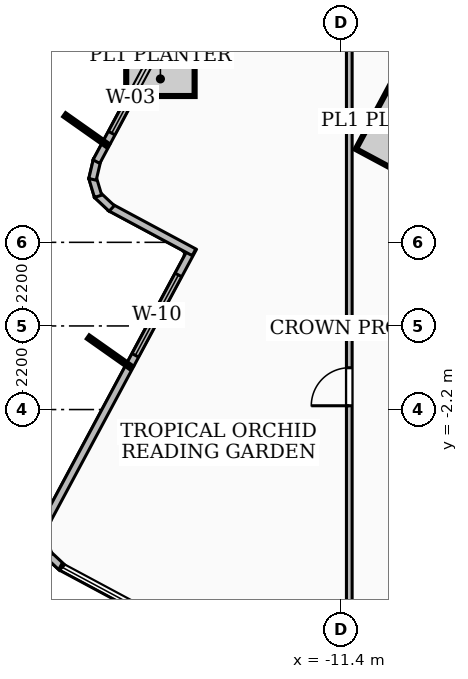
"""IFC4 building model, lengths in metres.
Left out: names, types, materials, properties, quantities, classifications, styles, units other than length and angle.
Written with IfcOpenShell. Run it as: python <this file> out.ifc"""

import sys

from ifc_helpers import new_model, si_unit, direction, frame, frame_2d, origin, place, context, subcontext, project, spatial, rectangle, extrude, element, fill, save


model = new_model("IFC4")
c1 = context("Model", 3, precision=1e-05, world=origin(), true_north=direction((0.0, 1.0)))
c2 = subcontext(c1, "Body", "Model", "MODEL_VIEW")
j1 = project(units=[si_unit("LENGTHUNIT", "METRE"), si_unit("PLANEANGLEUNIT", "RADIAN")], contexts=[c1])
p1 = place(None, origin())
s1 = spatial("IfcSite", under=j1, at=p1, CompositionType="ELEMENT")
p2 = place(p1, origin())
s2 = spatial("IfcBuilding", under=s1, at=p2, CompositionType="ELEMENT")
p3 = place(p2, frame((0.0, 0.0, 285.12)))
s3 = spatial("IfcBuildingStorey", under=s2, at=p3, CompositionType="ELEMENT", Elevation=285.12)
p4 = place(p3, frame((-18.74, -6.355, 0.0), z_axis=(0.0, 0.0, 1.0), x_axis=(-0.72940737532, 0.684079586619, 0.0)))
e1 = element("IfcWall", 1, at=p4, inside=s3, PredefinedType="SOLIDWALL", context=c2, shape_type="SweptSolid", body=[
    extrude(rectangle(XDim=0.528, YDim=0.2, at=frame_2d((0.264, 0.0))), origin(), (0.0, 0.0, 1.0), 3.84),
])
p5 = place(p3, frame((-19.144, -5.124, 0.0), z_axis=(0.0, 0.0, 1.0), x_axis=(0.472628491439, 0.881261771031, 0.0)))
e2 = element("IfcWall", 2, at=p5, inside=s3, PredefinedType="SOLIDWALL", context=c2, shape_type="SweptSolid", body=[
    extrude(rectangle(XDim=8.137, YDim=0.2, at=frame_2d((4.069, 0.0))), origin(), (0.0, 0.0, 1.0), 3.84),
])
p6 = place(p5, frame((4.937, 0.0, 0.85)))
e3 = element("IfcOpeningElement", 3, at=p6, cuts=e2, PredefinedType="OPENING", context=c2, shape_type="SweptSolid", body=[
    extrude(rectangle(XDim=2.4, YDim=1.65, at=frame_2d((1.2, 0.825))), frame((0.0, 0.11, 0.0), z_axis=(0.0, -1.0, 0.0), x_axis=(1.0, 0.0, 0.0)), (0.0, 0.0, 1.0), 0.22),
])
p7 = place(p3, frame((-15.265, 1.938, 0.0), z_axis=(0.0, 0.0, 1.0), x_axis=(-0.881265297533, 0.472621915875, 0.0)))
e4 = element("IfcWall", 4, at=p7, inside=s3, PredefinedType="SOLIDWALL", context=c2, shape_type="SweptSolid", body=[
    extrude(rectangle(XDim=2.503, YDim=0.2, at=frame_2d((1.251, 0.0))), origin(), (0.0, 0.0, 1.0), 3.84),
])
p8 = place(p3, frame((-17.431, 3.092, 0.0), z_axis=(0.0, 0.0, 1.0), x_axis=(-0.728771001466, 0.684757495338, 0.0)))
e5 = element("IfcWall", 5, at=p8, inside=s3, PredefinedType="SOLIDWALL", context=c2, shape_type="SweptSolid", body=[
    extrude(rectangle(XDim=0.527, YDim=0.2, at=frame_2d((0.263, 0.0))), origin(), (0.0, 0.0, 1.0), 3.84),
])
p9 = place(p3, frame((-17.79, 3.412, 0.0), z_axis=(0.0, 0.0, 1.0), x_axis=(-0.287478448092, 0.957787106763, 0.0)))
e6 = element("IfcWall", 6, at=p9, inside=s3, PredefinedType="SOLIDWALL", context=c2, shape_type="SweptSolid", body=[
    extrude(rectangle(XDim=0.515, YDim=0.2, at=frame_2d((0.257, 0.0))), origin(), (0.0, 0.0, 1.0), 3.84),
])
p10 = place(p3, frame((-17.937, 3.857, 0.0), z_axis=(0.0, 0.0, 1.0), x_axis=(0.229658673522, 0.973271233355, 0.0)))
e7 = element("IfcWall", 7, at=p10, inside=s3, PredefinedType="SOLIDWALL", context=c2, shape_type="SweptSolid", body=[
    extrude(rectangle(XDim=0.527, YDim=0.2, at=frame_2d((0.264, 0.0))), origin(), (0.0, 0.0, 1.0), 3.84),
])
p11 = place(p3, frame((-17.834, 4.324, 0.0), z_axis=(0.0, 0.0, 1.0), x_axis=(0.472635928498, 0.881257782429, 0.0)))
e8 = element("IfcWall", 8, at=p11, inside=s3, PredefinedType="SOLIDWALL", context=c2, shape_type="SweptSolid", body=[
    extrude(rectangle(XDim=9.233, YDim=0.2, at=frame_2d((4.617, 0.0))), origin(), (0.0, 0.0, 1.0), 3.84),
])
p12 = place(p11, frame((0.85, 0.0, 0.85)))
e9 = element("IfcOpeningElement", 9, at=p12, cuts=e8, PredefinedType="OPENING", context=c2, shape_type="SweptSolid", body=[
    extrude(rectangle(XDim=2.1, YDim=2.0, at=frame_2d((1.05, 1.0))), frame((0.0, 0.11, 0.0), z_axis=(0.0, -1.0, 0.0), x_axis=(1.0, 0.0, 0.0)), (0.0, 0.0, 1.0), 0.22),
])
p13 = place(p3, frame((-11.18, -11.928, 0.0), z_axis=(0.0, 0.0, 1.0), x_axis=(0.0, 1.0, 0.0)))
e10 = element("IfcWall", 10, at=p13, inside=s3, PredefinedType="PARTITIONING", context=c2, shape_type="SweptSolid", body=[
    extrude(rectangle(XDim=24.095, YDim=0.15, at=frame_2d((12.047, 0.0))), origin(), (0.0, 0.0, 1.0), 3.84),
])
p14 = place(p13, frame((9.828, 0.0, 0.0)))
e11 = element("IfcOpeningElement", 11, at=p14, cuts=e10, PredefinedType="OPENING", context=c2, shape_type="SweptSolid", body=[
    extrude(rectangle(XDim=1.0, YDim=2.1, at=frame_2d((0.5, 1.05))), frame((0.0, 0.085, 0.0), z_axis=(0.0, -1.0, 0.0), x_axis=(1.0, 0.0, 0.0)), (0.0, 0.0, 1.0), 0.17),
])
p15 = place(p6, origin())
e12 = element("IfcWindow", 12, at=p15, inside=s3, PartitioningType="SINGLE_PANEL", PredefinedType="WINDOW", context=c2, shape_type="SweptSolid", body=[
    extrude(rectangle(XDim=2.4, YDim=1.65, at=frame_2d((1.2, 0.825))), frame((0.0, 0.03, 0.0), z_axis=(0.0, -1.0, 0.0), x_axis=(1.0, 0.0, 0.0)), (0.0, 0.0, 1.0), 0.06),
])
fill(e3, e12)
p16 = place(p12, origin())
e13 = element("IfcWindow", 13, at=p16, inside=s3, PartitioningType="SINGLE_PANEL", PredefinedType="WINDOW", context=c2, shape_type="SweptSolid", body=[
    extrude(rectangle(XDim=2.1, YDim=2.0, at=frame_2d((1.05, 1.0))), frame((0.0, 0.03, 0.0), z_axis=(0.0, -1.0, 0.0), x_axis=(1.0, 0.0, 0.0)), (0.0, 0.0, 1.0), 0.06),
])
fill(e9, e13)
p17 = place(p14, origin())
e14 = element("IfcDoor", 14, at=p17, inside=s3, OperationType="SINGLE_SWING_LEFT", PredefinedType="DOOR", context=c2, shape_type="SweptSolid", body=[
    extrude(rectangle(XDim=1.0, YDim=2.1, at=frame_2d((0.5, 1.05))), frame((0.0, 0.025, 0.0), z_axis=(0.0, -1.0, 0.0), x_axis=(1.0, 0.0, 0.0)), (0.0, 0.0, 1.0), 0.05),
])
fill(e11, e14)
save(model, sys.argv[1])
